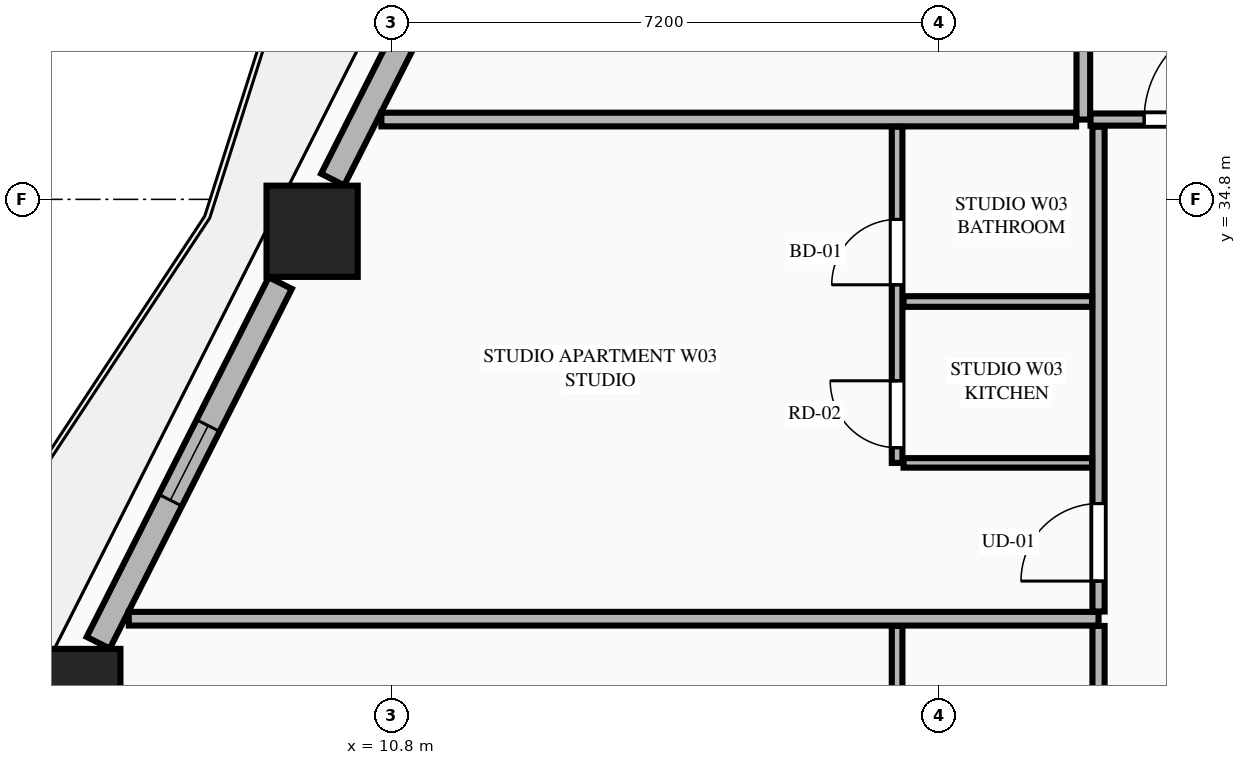
"""IFC4 building model, lengths in metres.
Left out: names, types, materials, properties, quantities, classifications, styles, units other than length and angle.
Written with IfcOpenShell. Run it as: python <this file> out.ifc"""

import sys

from ifc_helpers import new_model, si_unit, direction, frame, frame_2d, origin, origin_2d, place, context, subcontext, project, spatial, rectangle, extrude, element, fill, save


model = new_model("IFC4")
c1 = context("Model", 3, precision=1e-05, world=origin(), true_north=direction((0.0, 1.0)))
c2 = subcontext(c1, "Body", "Model", "MODEL_VIEW")
j1 = project(units=[si_unit("LENGTHUNIT", "METRE"), si_unit("PLANEANGLEUNIT", "RADIAN")], contexts=[c1])
p1 = place(None, origin())
s1 = spatial("IfcSite", under=j1, at=p1, CompositionType="ELEMENT")
p2 = place(p1, origin())
s2 = spatial("IfcBuilding", under=s1, at=p2, CompositionType="ELEMENT")
p3 = place(p2, frame((0.0, 0.0, 71.05)))
s3 = spatial("IfcBuildingStorey", under=s2, at=p3, CompositionType="ELEMENT", Elevation=71.05)
for number, where, z_axis, x_axis in (
    (1, (9.754, 34.38, 0.0), (0.0, 0.0, 1.0), (1.0, 0.0, 0.0)),
    (2, (6.632, 28.286, 0.0), (0.0, 0.0, 1.0), (1.0, 0.0, 0.0)),
):
    element("IfcColumn", number, at=place(p3, frame(where, z_axis=z_axis, x_axis=x_axis)), inside=s3, PredefinedType="COLUMN", context=c2, shape_type="SweptSolid", body=[
        extrude(rectangle(XDim=1.2, YDim=1.2, at=origin_2d()), origin(), (0.0, 0.0, 1.0), 3.55),
    ])
p4 = place(p3, frame((12.529, 40.01, 0.0), z_axis=(0.0, 0.0, 1.0), x_axis=(-0.451627137896, -0.892206774417, 0.0)))
e3 = element("IfcWall", 3, at=p4, inside=s3, PredefinedType="STANDARD", context=c2, shape_type="SweptSolid", body=[
    extrude(rectangle(XDim=5.547, YDim=0.34, at=frame_2d((2.773, 0.0))), origin(), (0.0, 0.0, 1.0), 2.652),
])
p5 = place(p4, frame((1.656, 0.0, 0.0)))
e4 = element("IfcOpeningElement", 4, at=p5, cuts=e3, PredefinedType="OPENING", context=c2, shape_type="SweptSolid", body=[
    extrude(rectangle(XDim=1.1, YDim=2.25, at=frame_2d((0.55, 1.125))), frame((0.0, 0.18, 0.0), z_axis=(0.0, -1.0, 0.0), x_axis=(1.0, 0.0, 0.0)), (0.0, 0.0, 1.0), 0.36),
])
p6 = place(p3, frame((9.335, 33.699, 0.0), z_axis=(0.0, 0.0, 1.0), x_axis=(-0.451590635984, -0.892225250422, 0.0)))
e5 = element("IfcWall", 5, at=p6, inside=s3, PredefinedType="STANDARD", context=c2, shape_type="SweptSolid", body=[
    extrude(rectangle(XDim=5.303, YDim=0.34, at=frame_2d((2.652, 0.0))), origin(), (0.0, 0.0, 1.0), 2.652),
])
p7 = place(p6, frame((2.102, 0.0, 0.75)))
e6 = element("IfcOpeningElement", 6, at=p7, cuts=e5, PredefinedType="OPENING", context=c2, shape_type="SweptSolid", body=[
    extrude(rectangle(XDim=1.1, YDim=1.752, at=frame_2d((0.55, 0.876))), frame((0.0, 0.18, 0.0), z_axis=(0.0, -1.0, 0.0), x_axis=(1.0, 0.0, 0.0)), (0.0, 0.0, 1.0), 0.36),
])
p8 = place(p3, frame((19.9, 35.85, 0.0), z_axis=(0.0, 0.0, 1.0), x_axis=(0.0, 1.0, 0.0)))
e7 = element("IfcWall", 7, at=p8, inside=s3, PredefinedType="PARTITIONING", context=c2, shape_type="SweptSolid", body=[
    extrude(rectangle(XDim=13.295, YDim=0.18, at=frame_2d((6.647, 0.0))), origin(), (0.0, 0.0, 1.0), 3.27),
])
p9 = place(p3, frame((19.995, 35.85, 0.0), z_axis=(0.0, 0.0, 1.0), x_axis=(1.0, 0.0, 0.0)))
e8 = element("IfcWall", 8, at=p9, inside=s3, PredefinedType="PARTITIONING", context=c2, shape_type="SweptSolid", body=[
    extrude(rectangle(XDim=16.432, YDim=0.16, at=frame_2d((8.216, 0.0))), origin(), (0.0, 0.0, 1.0), 3.27),
])
p10 = place(p9, frame((0.705, 0.0, 0.0)))
e9 = element("IfcOpeningElement", 9, at=p10, cuts=e8, PredefinedType="OPENING", context=c2, shape_type="SweptSolid", body=[
    extrude(rectangle(XDim=1.35, YDim=2.35, at=frame_2d((0.675, 1.175))), frame((0.0, 0.09, 0.0), z_axis=(0.0, -1.0, 0.0), x_axis=(1.0, 0.0, 0.0)), (0.0, 0.0, 1.0), 0.18),
])
p11 = place(p3, frame((10.665, 35.85, 0.0), z_axis=(0.0, 0.0, 1.0), x_axis=(1.0, 0.0, 0.0)))
e10 = element("IfcWall", 10, at=p11, inside=s3, PredefinedType="PARTITIONING", context=c2, shape_type="SweptSolid", body=[
    extrude(rectangle(XDim=9.14, YDim=0.18, at=frame_2d((4.57, 0.0))), origin(), (0.0, 0.0, 1.0), 3.27),
])
p12 = place(p3, frame((20.1, 22.811, 0.0), z_axis=(0.0, 0.0, 1.0), x_axis=(0.0, 1.0, 0.0)))
e11 = element("IfcWall", 11, at=p12, inside=s3, PredefinedType="PARTITIONING", context=c2, shape_type="SweptSolid", body=[
    extrude(rectangle(XDim=6.377, YDim=0.16, at=frame_2d((3.188, 0.0))), origin(), (0.0, 0.0, 1.0), 3.27),
])
p13 = place(p12, frame((0.4, 0.0, 0.0)))
e12 = element("IfcOpeningElement", 12, at=p13, cuts=e11, PredefinedType="OPENING", context=c2, shape_type="SweptSolid", body=[
    extrude(rectangle(XDim=1.02, YDim=2.25, at=frame_2d((0.51, 1.125))), frame((0.0, 0.09, 0.0), z_axis=(0.0, -1.0, 0.0), x_axis=(1.0, 0.0, 0.0)), (0.0, 0.0, 1.0), 0.18),
])
p14 = place(p3, frame((17.45, 24.766, 0.0), z_axis=(0.0, 0.0, 1.0), x_axis=(0.0, 1.0, 0.0)))
e13 = element("IfcWall", 13, at=p14, inside=s3, PredefinedType="PLUMBINGWALL", context=c2, shape_type="SweptSolid", body=[
    extrude(rectangle(XDim=4.422, YDim=0.14, at=frame_2d((2.211, 0.0))), origin(), (0.0, 0.0, 1.0), 3.27),
])
p15 = place(p14, frame((2.343, 0.0, 0.0)))
e14 = element("IfcOpeningElement", 14, at=p15, cuts=e13, PredefinedType="OPENING", context=c2, shape_type="SweptSolid", body=[
    extrude(rectangle(XDim=0.86, YDim=2.1, at=frame_2d((0.43, 1.05))), frame((0.0, 0.08, 0.0), z_axis=(0.0, -1.0, 0.0), x_axis=(1.0, 0.0, 0.0)), (0.0, 0.0, 1.0), 0.16),
])
p16 = place(p14, frame((0.2, 0.0, 0.0)))
e15 = element("IfcOpeningElement", 15, at=p16, cuts=e13, PredefinedType="OPENING", context=c2, shape_type="SweptSolid", body=[
    extrude(rectangle(XDim=0.88, YDim=2.15, at=frame_2d((0.44, 1.075))), frame((0.0, 0.08, 0.0), z_axis=(0.0, -1.0, 0.0), x_axis=(1.0, 0.0, 0.0)), (0.0, 0.0, 1.0), 0.16),
])
p17 = place(p3, frame((7.342, 29.283, 0.0), z_axis=(0.0, 0.0, 1.0), x_axis=(1.0, 0.0, 0.0)))
e16 = element("IfcWall", 16, at=p17, inside=s3, PredefinedType="PARTITIONING", context=c2, shape_type="SweptSolid", body=[
    extrude(rectangle(XDim=12.758, YDim=0.18, at=frame_2d((6.379, 0.0))), origin(), (0.0, 0.0, 1.0), 3.27),
])
p18 = place(p3, frame((20.1, 29.378, 0.0), z_axis=(0.0, 0.0, 1.0), x_axis=(0.0, 1.0, 0.0)))
e17 = element("IfcWall", 17, at=p18, inside=s3, PredefinedType="PARTITIONING", context=c2, shape_type="SweptSolid", body=[
    extrude(rectangle(XDim=6.377, YDim=0.16, at=frame_2d((3.188, 0.0))), origin(), (0.0, 0.0, 1.0), 2.64),
])
p19 = place(p18, frame((0.4, 0.0, 0.0)))
e18 = element("IfcOpeningElement", 18, at=p19, cuts=e17, PredefinedType="OPENING", context=c2, shape_type="SweptSolid", body=[
    extrude(rectangle(XDim=1.02, YDim=2.25, at=frame_2d((0.51, 1.125))), frame((0.0, 0.09, 0.0), z_axis=(0.0, -1.0, 0.0), x_axis=(1.0, 0.0, 0.0)), (0.0, 0.0, 1.0), 0.18),
])
p20 = place(p3, frame((17.535, 31.333, 0.0), z_axis=(0.0, 0.0, 1.0), x_axis=(1.0, 0.0, 0.0)))
e19 = element("IfcWall", 19, at=p20, inside=s3, PredefinedType="PARTITIONING", context=c2, shape_type="SweptSolid", body=[
    extrude(rectangle(XDim=2.48, YDim=0.125, at=frame_2d((1.24, 0.0))), origin(), (0.0, 0.0, 1.0), 3.27),
])
p21 = place(p3, frame((17.45, 31.333, 0.0), z_axis=(0.0, 0.0, 1.0), x_axis=(0.0, 1.0, 0.0)))
e20 = element("IfcWall", 20, at=p21, inside=s3, PredefinedType="PLUMBINGWALL", context=c2, shape_type="SweptSolid", body=[
    extrude(rectangle(XDim=4.422, YDim=0.14, at=frame_2d((2.211, 0.0))), origin(), (0.0, 0.0, 1.0), 3.27),
])
p22 = place(p21, frame((2.343, 0.0, 0.0)))
e21 = element("IfcOpeningElement", 21, at=p22, cuts=e20, PredefinedType="OPENING", context=c2, shape_type="SweptSolid", body=[
    extrude(rectangle(XDim=0.86, YDim=2.1, at=frame_2d((0.43, 1.05))), frame((0.0, 0.08, 0.0), z_axis=(0.0, -1.0, 0.0), x_axis=(1.0, 0.0, 0.0)), (0.0, 0.0, 1.0), 0.16),
])
p23 = place(p21, frame((0.2, 0.0, 0.0)))
e22 = element("IfcOpeningElement", 22, at=p23, cuts=e20, PredefinedType="OPENING", context=c2, shape_type="SweptSolid", body=[
    extrude(rectangle(XDim=0.88, YDim=2.15, at=frame_2d((0.44, 1.075))), frame((0.0, 0.08, 0.0), z_axis=(0.0, -1.0, 0.0), x_axis=(1.0, 0.0, 0.0)), (0.0, 0.0, 1.0), 0.16),
])
p24 = place(p3, frame((17.535, 33.456, 0.0), z_axis=(0.0, 0.0, 1.0), x_axis=(1.0, 0.0, 0.0)))
e23 = element("IfcWall", 23, at=p24, inside=s3, PredefinedType="PLUMBINGWALL", context=c2, shape_type="SweptSolid", body=[
    extrude(rectangle(XDim=2.48, YDim=0.14, at=frame_2d((1.24, 0.0))), origin(), (0.0, 0.0, 1.0), 2.64),
])
p25 = place(p7, origin())
e24 = element("IfcWindow", 24, at=p25, inside=s3, PartitioningType="SINGLE_PANEL", PredefinedType="WINDOW", context=c2, shape_type="SweptSolid", body=[
    extrude(rectangle(XDim=1.1, YDim=1.752, at=frame_2d((0.55, 0.876))), frame((0.0, 0.03, 0.0), z_axis=(0.0, -1.0, 0.0), x_axis=(1.0, 0.0, 0.0)), (0.0, 0.0, 1.0), 0.06),
])
fill(e6, e24)
p26 = place(p10, origin())
e25 = element("IfcDoor", 25, at=p26, inside=s3, OperationType="SINGLE_SWING_RIGHT", PredefinedType="DOOR", context=c2, shape_type="SweptSolid", body=[
    extrude(rectangle(XDim=1.35, YDim=2.35, at=frame_2d((0.675, 1.175))), frame((0.0, 0.025, 0.0), z_axis=(0.0, -1.0, 0.0), x_axis=(1.0, 0.0, 0.0)), (0.0, 0.0, 1.0), 0.05),
])
fill(e9, e25)
p27 = place(p22, origin())
e26 = element("IfcDoor", 26, at=p27, inside=s3, OperationType="SINGLE_SWING_LEFT", PredefinedType="DOOR", context=c2, shape_type="SweptSolid", body=[
    extrude(rectangle(XDim=0.86, YDim=2.1, at=frame_2d((0.43, 1.05))), frame((0.0, 0.025, 0.0), z_axis=(0.0, -1.0, 0.0), x_axis=(1.0, 0.0, 0.0)), (0.0, 0.0, 1.0), 0.05),
])
fill(e21, e26)
p28 = place(p19, origin())
e27 = element("IfcDoor", 27, at=p28, inside=s3, OperationType="SINGLE_SWING_LEFT", PredefinedType="DOOR", context=c2, shape_type="SweptSolid", body=[
    extrude(rectangle(XDim=1.02, YDim=2.25, at=frame_2d((0.51, 1.125))), frame((0.0, 0.025, 0.0), z_axis=(0.0, -1.0, 0.0), x_axis=(1.0, 0.0, 0.0)), (0.0, 0.0, 1.0), 0.05),
])
fill(e18, e27)
p29 = place(p23, origin())
e28 = element("IfcDoor", 28, at=p29, inside=s3, OperationType="SINGLE_SWING_RIGHT", PredefinedType="DOOR", context=c2, shape_type="SweptSolid", body=[
    extrude(rectangle(XDim=0.88, YDim=2.15, at=frame_2d((0.44, 1.075))), frame((0.0, 0.025, 0.0), z_axis=(0.0, -1.0, 0.0), x_axis=(1.0, 0.0, 0.0)), (0.0, 0.0, 1.0), 0.05),
])
fill(e22, e28)
save(model, sys.argv[1])
